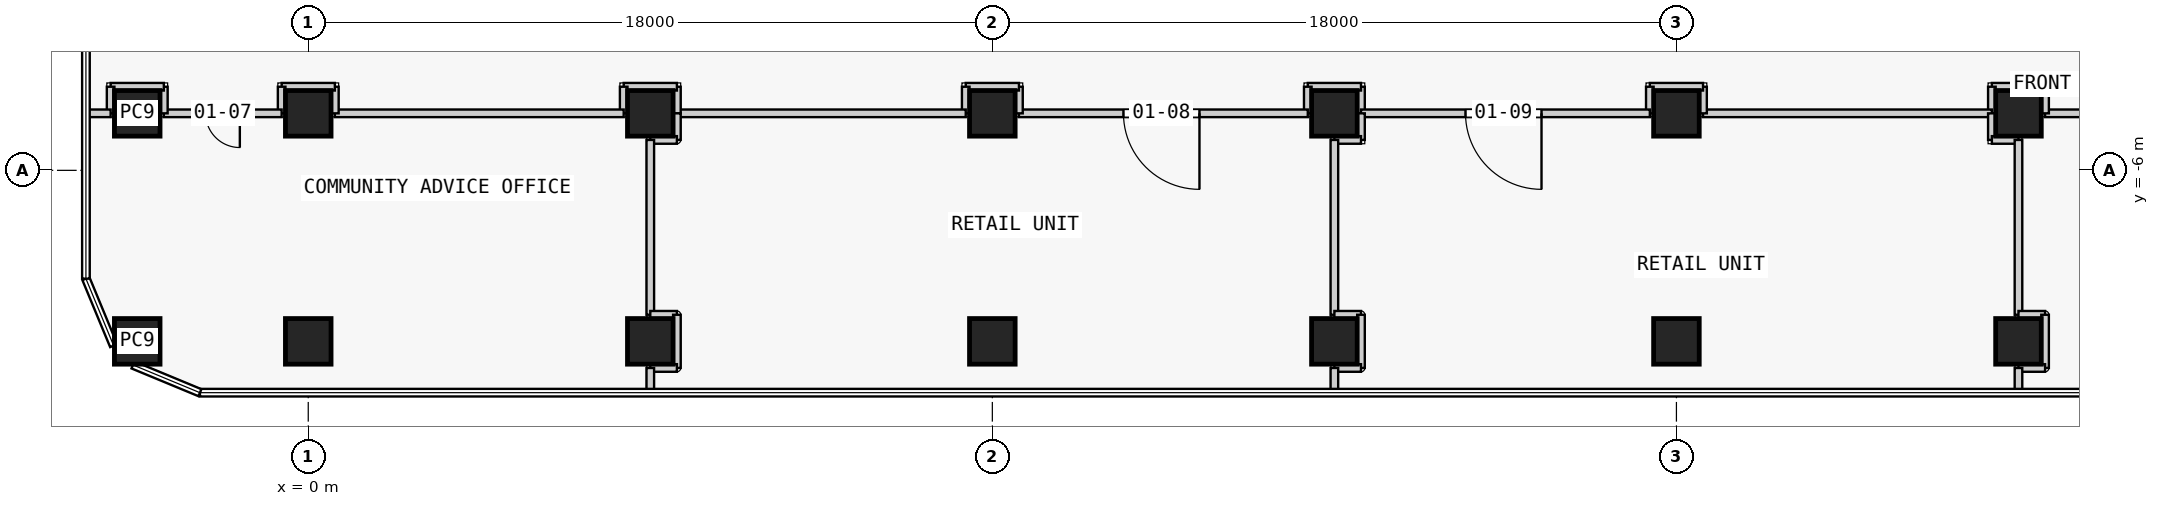
"""IFC4 building model, lengths in metres.
Left out: names, types, materials, properties, quantities, classifications, styles, units other than length and angle.
Written with IfcOpenShell. Run it as: python <this file> out.ifc"""

import sys

from ifc_helpers import new_model, si_unit, direction, frame, frame_2d, origin, origin_2d, place, context, subcontext, project, spatial, rectangle, extrude, element, fill, save


model = new_model("IFC4")
c1 = context("Model", 3, precision=1e-05, world=origin(), true_north=direction((0.0, 1.0)))
c2 = subcontext(c1, "Body", "Model", "MODEL_VIEW")
j1 = project(units=[si_unit("LENGTHUNIT", "METRE"), si_unit("PLANEANGLEUNIT", "RADIAN")], contexts=[c1])
p1 = place(None, origin())
s1 = spatial("IfcSite", under=j1, at=p1, CompositionType="ELEMENT")
p2 = place(p1, origin())
s2 = spatial("IfcBuilding", under=s1, at=p2, CompositionType="ELEMENT")
p3 = place(p2, frame((0.0, 0.0, 8.0)))
s3 = spatial("IfcBuildingStorey", under=s2, at=p3, CompositionType="ELEMENT", Elevation=8.0)
for number, where, z_axis, x_axis in (
    (1, (-4.5, -10.5, 0.0), (0.0, 0.0, 1.0), (1.0, 0.0, 0.0)),
    (2, (-4.5, -4.5, 0.0), (0.0, 0.0, 1.0), (1.0, 0.0, 0.0)),
    (3, (0.0, -10.5, 0.0), (0.0, 0.0, 1.0), (1.0, 0.0, 0.0)),
    (4, (0.0, -4.5, 0.0), (0.0, 0.0, 1.0), (1.0, 0.0, 0.0)),
    (5, (9.0, -10.5, 0.0), (0.0, 0.0, 1.0), (1.0, 0.0, 0.0)),
    (6, (9.0, -4.5, 0.0), (0.0, 0.0, 1.0), (1.0, 0.0, 0.0)),
    (7, (18.0, -10.5, 0.0), (0.0, 0.0, 1.0), (1.0, 0.0, 0.0)),
    (8, (18.0, -4.5, 0.0), (0.0, 0.0, 1.0), (1.0, 0.0, 0.0)),
    (9, (27.0, -10.5, 0.0), (0.0, 0.0, 1.0), (1.0, 0.0, 0.0)),
    (10, (27.0, -4.5, 0.0), (0.0, 0.0, 1.0), (1.0, 0.0, 0.0)),
    (11, (36.0, -10.5, 0.0), (0.0, 0.0, 1.0), (1.0, 0.0, 0.0)),
    (12, (36.0, -4.5, 0.0), (0.0, 0.0, 1.0), (1.0, 0.0, 0.0)),
    (13, (45.0, -10.5, 0.0), (0.0, 0.0, 1.0), (1.0, 0.0, 0.0)),
    (14, (45.0, -4.5, 0.0), (0.0, 0.0, 1.0), (1.0, 0.0, 0.0)),
):
    element("IfcColumn", number, at=place(p3, frame(where, z_axis=z_axis, x_axis=x_axis)), inside=s3, PredefinedType="COLUMN", context=c2, shape_type="SweptSolid", body=[
        extrude(rectangle(XDim=1.2, YDim=1.2, at=origin_2d()), origin(), (0.0, 0.0, 1.0), 4.8),
    ])
p4 = place(p3, frame((53.3, -4.5, 0.0), z_axis=(0.0, 0.0, 1.0), x_axis=(-1.0, 0.0, 0.0)))
e15 = element("IfcWall", 15, at=p4, inside=s3, PredefinedType="PARTITIONING", context=c2, shape_type="SweptSolid", body=[
    extrude(rectangle(XDim=7.6, YDim=0.2, at=frame_2d((3.8, 0.0))), origin(), (0.0, 0.0, 1.0), 3.75),
])
p5 = place(p3, frame((45.7, -4.5, 0.0), z_axis=(0.0, 0.0, 1.0), x_axis=(0.0, 1.0, 0.0)))
e16 = element("IfcWall", 16, at=p5, inside=s3, PredefinedType="PARTITIONING", context=c2, shape_type="SweptSolid", body=[
    extrude(rectangle(XDim=0.7, YDim=0.2, at=frame_2d((0.35, 0.0))), origin(), (0.0, 0.0, 1.0), 3.75),
])
p6 = place(p3, frame((45.7, -3.8, 0.0), z_axis=(0.0, 0.0, 1.0), x_axis=(-1.0, 0.0, 0.0)))
e17 = element("IfcWall", 17, at=p6, inside=s3, PredefinedType="PARTITIONING", context=c2, shape_type="SweptSolid", body=[
    extrude(rectangle(XDim=1.4, YDim=0.2, at=frame_2d((0.7, 0.0))), origin(), (0.0, 0.0, 1.0), 3.75),
])
for number, where, z_axis, x_axis in (
    (18, (44.3, -3.8, 0.0), (0.0, 0.0, 1.0), (0.0, -1.0, 0.0)),
    (19, (27.7, -4.5, 0.0), (0.0, 0.0, 1.0), (0.0, 1.0, 0.0)),
):
    element("IfcWall", number, at=place(p3, frame(where, z_axis=z_axis, x_axis=x_axis)), inside=s3, PredefinedType="PARTITIONING", context=c2, shape_type="SweptSolid", body=[
        extrude(rectangle(XDim=0.7, YDim=0.2, at=frame_2d((0.35, 0.0))), origin(), (0.0, 0.0, 1.0), 3.75),
    ])
p7 = place(p3, frame((27.7, -3.8, 0.0), z_axis=(0.0, 0.0, 1.0), x_axis=(-1.0, 0.0, 0.0)))
e20 = element("IfcWall", 20, at=p7, inside=s3, PredefinedType="PARTITIONING", context=c2, shape_type="SweptSolid", body=[
    extrude(rectangle(XDim=1.4, YDim=0.2, at=frame_2d((0.7, 0.0))), origin(), (0.0, 0.0, 1.0), 3.75),
])
p8 = place(p3, frame((26.3, -3.8, 0.0), z_axis=(0.0, 0.0, 1.0), x_axis=(0.0, -1.0, 0.0)))
e21 = element("IfcWall", 21, at=p8, inside=s3, PredefinedType="PARTITIONING", context=c2, shape_type="SweptSolid", body=[
    extrude(rectangle(XDim=0.7, YDim=0.2, at=frame_2d((0.35, 0.0))), origin(), (0.0, 0.0, 1.0), 3.75),
])
p9 = place(p3, frame((26.3, -4.5, 0.0), z_axis=(0.0, 0.0, 1.0), x_axis=(-1.0, 0.0, 0.0)))
e22 = element("IfcWall", 22, at=p9, inside=s3, PredefinedType="PARTITIONING", context=c2, shape_type="SweptSolid", body=[
    extrude(rectangle(XDim=7.6, YDim=0.2, at=frame_2d((3.8, 0.0))), origin(), (0.0, 0.0, 1.0), 3.75),
])
p10 = place(p9, frame((2.85, 0.0, 0.0)))
e23 = element("IfcOpeningElement", 23, at=p10, cuts=e22, PredefinedType="OPENING", context=c2, shape_type="SweptSolid", body=[
    extrude(rectangle(XDim=2.0, YDim=2.4, at=frame_2d((1.0, 1.2))), frame((0.0, 0.11, 0.0), z_axis=(0.0, -1.0, 0.0), x_axis=(1.0, 0.0, 0.0)), (0.0, 0.0, 1.0), 0.22),
])
p11 = place(p3, frame((18.7, -4.5, 0.0), z_axis=(0.0, 0.0, 1.0), x_axis=(0.0, 1.0, 0.0)))
e24 = element("IfcWall", 24, at=p11, inside=s3, PredefinedType="PARTITIONING", context=c2, shape_type="SweptSolid", body=[
    extrude(rectangle(XDim=0.7, YDim=0.2, at=frame_2d((0.35, 0.0))), origin(), (0.0, 0.0, 1.0), 3.75),
])
p12 = place(p3, frame((18.7, -3.8, 0.0), z_axis=(0.0, 0.0, 1.0), x_axis=(-1.0, 0.0, 0.0)))
e25 = element("IfcWall", 25, at=p12, inside=s3, PredefinedType="PARTITIONING", context=c2, shape_type="SweptSolid", body=[
    extrude(rectangle(XDim=1.4, YDim=0.2, at=frame_2d((0.7, 0.0))), origin(), (0.0, 0.0, 1.0), 4.45),
])
p13 = place(p3, frame((17.3, -3.8, 0.0), z_axis=(0.0, 0.0, 1.0), x_axis=(0.0, -1.0, 0.0)))
e26 = element("IfcWall", 26, at=p13, inside=s3, PredefinedType="PARTITIONING", context=c2, shape_type="SweptSolid", body=[
    extrude(rectangle(XDim=0.7, YDim=0.2, at=frame_2d((0.35, 0.0))), origin(), (0.0, 0.0, 1.0), 3.75),
])
for number, where, z_axis, x_axis in (
    (27, (17.3, -4.5, 0.0), (0.0, 0.0, 1.0), (-1.0, 0.0, 0.0)),
    (28, (44.3, -4.5, 0.0), (0.0, 0.0, 1.0), (-1.0, 0.0, 0.0)),
):
    element("IfcWall", number, at=place(p3, frame(where, z_axis=z_axis, x_axis=x_axis)), inside=s3, PredefinedType="PARTITIONING", context=c2, shape_type="SweptSolid", body=[
        extrude(rectangle(XDim=7.6, YDim=0.2, at=frame_2d((3.8, 0.0))), origin(), (0.0, 0.0, 1.0), 3.75),
    ])
p14 = place(p3, frame((36.7, -4.5, 0.0), z_axis=(0.0, 0.0, 1.0), x_axis=(0.0, 1.0, 0.0)))
e29 = element("IfcWall", 29, at=p14, inside=s3, PredefinedType="PARTITIONING", context=c2, shape_type="SweptSolid", body=[
    extrude(rectangle(XDim=0.7, YDim=0.2, at=frame_2d((0.35, 0.0))), origin(), (0.0, 0.0, 1.0), 3.75),
])
p15 = place(p3, frame((36.7, -3.8, 0.0), z_axis=(0.0, 0.0, 1.0), x_axis=(-1.0, 0.0, 0.0)))
e30 = element("IfcWall", 30, at=p15, inside=s3, PredefinedType="PARTITIONING", context=c2, shape_type="SweptSolid", body=[
    extrude(rectangle(XDim=1.4, YDim=0.2, at=frame_2d((0.7, 0.0))), origin(), (0.0, 0.0, 1.0), 3.75),
])
p16 = place(p3, frame((35.3, -3.8, 0.0), z_axis=(0.0, 0.0, 1.0), x_axis=(0.0, -1.0, 0.0)))
e31 = element("IfcWall", 31, at=p16, inside=s3, PredefinedType="PARTITIONING", context=c2, shape_type="SweptSolid", body=[
    extrude(rectangle(XDim=0.7, YDim=0.2, at=frame_2d((0.35, 0.0))), origin(), (0.0, 0.0, 1.0), 3.75),
])
p17 = place(p3, frame((35.3, -4.5, 0.0), z_axis=(0.0, 0.0, 1.0), x_axis=(-1.0, 0.0, 0.0)))
e32 = element("IfcWall", 32, at=p17, inside=s3, PredefinedType="PARTITIONING", context=c2, shape_type="SweptSolid", body=[
    extrude(rectangle(XDim=7.6, YDim=0.2, at=frame_2d((3.8, 0.0))), origin(), (0.0, 0.0, 1.0), 3.75),
])
p18 = place(p17, frame((2.85, 0.0, 0.0)))
e33 = element("IfcOpeningElement", 33, at=p18, cuts=e32, PredefinedType="OPENING", context=c2, shape_type="SweptSolid", body=[
    extrude(rectangle(XDim=2.0, YDim=2.4, at=frame_2d((1.0, 1.2))), frame((0.0, 0.11, 0.0), z_axis=(0.0, -1.0, 0.0), x_axis=(1.0, 0.0, 0.0)), (0.0, 0.0, 1.0), 0.22),
])
p19 = place(p3, frame((9.7, -4.5, 0.0), z_axis=(0.0, 0.0, 1.0), x_axis=(0.0, 1.0, 0.0)))
e34 = element("IfcWall", 34, at=p19, inside=s3, PredefinedType="PARTITIONING", context=c2, shape_type="SweptSolid", body=[
    extrude(rectangle(XDim=0.7, YDim=0.2, at=frame_2d((0.35, 0.0))), origin(), (0.0, 0.0, 1.0), 3.75),
])
p20 = place(p3, frame((9.7, -3.8, 0.0), z_axis=(0.0, 0.0, 1.0), x_axis=(-1.0, 0.0, 0.0)))
e35 = element("IfcWall", 35, at=p20, inside=s3, PredefinedType="PARTITIONING", context=c2, shape_type="SweptSolid", body=[
    extrude(rectangle(XDim=1.4, YDim=0.2, at=frame_2d((0.7, 0.0))), origin(), (0.0, 0.0, 1.0), 4.45),
])
p21 = place(p3, frame((8.3, -3.8, 0.0), z_axis=(0.0, 0.0, 1.0), x_axis=(0.0, -1.0, 0.0)))
e36 = element("IfcWall", 36, at=p21, inside=s3, PredefinedType="PARTITIONING", context=c2, shape_type="SweptSolid", body=[
    extrude(rectangle(XDim=0.7, YDim=0.2, at=frame_2d((0.35, 0.0))), origin(), (0.0, 0.0, 1.0), 3.75),
])
p22 = place(p3, frame((8.3, -4.5, 0.0), z_axis=(0.0, 0.0, 1.0), x_axis=(-1.0, 0.0, 0.0)))
e37 = element("IfcWall", 37, at=p22, inside=s3, PredefinedType="PARTITIONING", context=c2, shape_type="SweptSolid", body=[
    extrude(rectangle(XDim=7.6, YDim=0.2, at=frame_2d((3.8, 0.0))), origin(), (0.0, 0.0, 1.0), 3.75),
])
p23 = place(p3, frame((0.7, -4.5, 0.0), z_axis=(0.0, 0.0, 1.0), x_axis=(0.0, 1.0, 0.0)))
e38 = element("IfcWall", 38, at=p23, inside=s3, PredefinedType="PARTITIONING", context=c2, shape_type="SweptSolid", body=[
    extrude(rectangle(XDim=0.7, YDim=0.2, at=frame_2d((0.35, 0.0))), origin(), (0.0, 0.0, 1.0), 3.75),
])
p24 = place(p3, frame((0.7, -3.8, 0.0), z_axis=(0.0, 0.0, 1.0), x_axis=(-1.0, 0.0, 0.0)))
e39 = element("IfcWall", 39, at=p24, inside=s3, PredefinedType="PARTITIONING", context=c2, shape_type="SweptSolid", body=[
    extrude(rectangle(XDim=1.4, YDim=0.2, at=frame_2d((0.7, 0.0))), origin(), (0.0, 0.0, 1.0), 4.45),
])
p25 = place(p3, frame((-0.7, -3.8, 0.0), z_axis=(0.0, 0.0, 1.0), x_axis=(0.0, -1.0, 0.0)))
e40 = element("IfcWall", 40, at=p25, inside=s3, PredefinedType="PARTITIONING", context=c2, shape_type="SweptSolid", body=[
    extrude(rectangle(XDim=0.7, YDim=0.2, at=frame_2d((0.35, 0.0))), origin(), (0.0, 0.0, 1.0), 3.75),
])
p26 = place(p3, frame((-0.7, -4.5, 0.0), z_axis=(0.0, 0.0, 1.0), x_axis=(-1.0, 0.0, 0.0)))
e41 = element("IfcWall", 41, at=p26, inside=s3, PredefinedType="PARTITIONING", context=c2, shape_type="SweptSolid", body=[
    extrude(rectangle(XDim=3.1, YDim=0.2, at=frame_2d((1.55, 0.0))), origin(), (0.0, 0.0, 1.0), 3.75),
])
p27 = place(p26, frame((1.1, 0.0, 0.0)))
e42 = element("IfcOpeningElement", 42, at=p27, cuts=e41, PredefinedType="OPENING", context=c2, shape_type="SweptSolid", body=[
    extrude(rectangle(XDim=0.9, YDim=2.1, at=frame_2d((0.45, 1.05))), frame((0.0, 0.11, 0.0), z_axis=(0.0, -1.0, 0.0), x_axis=(1.0, 0.0, 0.0)), (0.0, 0.0, 1.0), 0.22),
])
for number, where, z_axis, x_axis in (
    (43, (-3.8, -4.5, 0.0), (0.0, 0.0, 1.0), (0.0, 1.0, 0.0)),
    (44, (44.3, -4.5, 0.0), (0.0, 0.0, 1.0), (0.0, -1.0, 0.0)),
    (45, (44.3, -5.2, 0.0), (0.0, 0.0, 1.0), (1.0, 0.0, 0.0)),
):
    element("IfcWall", number, at=place(p3, frame(where, z_axis=z_axis, x_axis=x_axis)), inside=s3, PredefinedType="PARTITIONING", context=c2, shape_type="SweptSolid", body=[
        extrude(rectangle(XDim=0.7, YDim=0.2, at=frame_2d((0.35, 0.0))), origin(), (0.0, 0.0, 1.0), 3.75),
    ])
p28 = place(p3, frame((45.0, -5.2, 0.0), z_axis=(0.0, 0.0, 1.0), x_axis=(0.0, -1.0, 0.0)))
e46 = element("IfcWall", 46, at=p28, inside=s3, PredefinedType="PARTITIONING", context=c2, shape_type="SweptSolid", body=[
    extrude(rectangle(XDim=4.6, YDim=0.2, at=frame_2d((2.3, 0.0))), origin(), (0.0, 0.0, 1.0), 3.75),
])
p29 = place(p3, frame((45.0, -9.8, 0.0), z_axis=(0.0, 0.0, 1.0), x_axis=(1.0, 0.0, 0.0)))
e47 = element("IfcWall", 47, at=p29, inside=s3, PredefinedType="PARTITIONING", context=c2, shape_type="SweptSolid", body=[
    extrude(rectangle(XDim=0.7, YDim=0.2, at=frame_2d((0.35, 0.0))), origin(), (0.0, 0.0, 1.0), 3.75),
])
p30 = place(p3, frame((45.7, -9.8, 0.0), z_axis=(0.0, 0.0, 1.0), x_axis=(0.0, -1.0, 0.0)))
e48 = element("IfcWall", 48, at=p30, inside=s3, PredefinedType="PARTITIONING", context=c2, shape_type="SweptSolid", body=[
    extrude(rectangle(XDim=1.4, YDim=0.2, at=frame_2d((0.7, 0.0))), origin(), (0.0, 0.0, 1.0), 3.75),
])
p31 = place(p3, frame((45.7, -11.2, 0.0), z_axis=(0.0, 0.0, 1.0), x_axis=(-1.0, 0.0, 0.0)))
e49 = element("IfcWall", 49, at=p31, inside=s3, PredefinedType="PARTITIONING", context=c2, shape_type="SweptSolid", body=[
    extrude(rectangle(XDim=0.7, YDim=0.2, at=frame_2d((0.35, 0.0))), origin(), (0.0, 0.0, 1.0), 4.45),
])
p32 = place(p3, frame((45.0, -11.2, 0.0), z_axis=(0.0, 0.0, 1.0), x_axis=(0.0, -1.0, 0.0)))
e50 = element("IfcWall", 50, at=p32, inside=s3, PredefinedType="PARTITIONING", context=c2, shape_type="SweptSolid", body=[
    extrude(rectangle(XDim=0.65, YDim=0.2, at=frame_2d((0.325, 0.0))), origin(), (0.0, 0.0, 1.0), 4.45),
])
for number, where, z_axis, x_axis in (
    (51, (27.7, -4.5, 0.0), (0.0, 0.0, 1.0), (0.0, -1.0, 0.0)),
    (52, (27.7, -5.2, 0.0), (0.0, 0.0, 1.0), (-1.0, 0.0, 0.0)),
):
    element("IfcWall", number, at=place(p3, frame(where, z_axis=z_axis, x_axis=x_axis)), inside=s3, PredefinedType="PARTITIONING", context=c2, shape_type="SweptSolid", body=[
        extrude(rectangle(XDim=0.7, YDim=0.2, at=frame_2d((0.35, 0.0))), origin(), (0.0, 0.0, 1.0), 3.75),
    ])
p33 = place(p3, frame((27.0, -5.2, 0.0), z_axis=(0.0, 0.0, 1.0), x_axis=(0.0, -1.0, 0.0)))
e53 = element("IfcWall", 53, at=p33, inside=s3, PredefinedType="PARTITIONING", context=c2, shape_type="SweptSolid", body=[
    extrude(rectangle(XDim=4.6, YDim=0.2, at=frame_2d((2.3, 0.0))), origin(), (0.0, 0.0, 1.0), 3.75),
])
p34 = place(p3, frame((27.0, -9.8, 0.0), z_axis=(0.0, 0.0, 1.0), x_axis=(1.0, 0.0, 0.0)))
e54 = element("IfcWall", 54, at=p34, inside=s3, PredefinedType="PARTITIONING", context=c2, shape_type="SweptSolid", body=[
    extrude(rectangle(XDim=0.7, YDim=0.2, at=frame_2d((0.35, 0.0))), origin(), (0.0, 0.0, 1.0), 3.75),
])
p35 = place(p3, frame((27.7, -9.8, 0.0), z_axis=(0.0, 0.0, 1.0), x_axis=(0.0, -1.0, 0.0)))
e55 = element("IfcWall", 55, at=p35, inside=s3, PredefinedType="PARTITIONING", context=c2, shape_type="SweptSolid", body=[
    extrude(rectangle(XDim=1.4, YDim=0.2, at=frame_2d((0.7, 0.0))), origin(), (0.0, 0.0, 1.0), 3.75),
])
p36 = place(p3, frame((27.7, -11.2, 0.0), z_axis=(0.0, 0.0, 1.0), x_axis=(-1.0, 0.0, 0.0)))
e56 = element("IfcWall", 56, at=p36, inside=s3, PredefinedType="PARTITIONING", context=c2, shape_type="SweptSolid", body=[
    extrude(rectangle(XDim=0.7, YDim=0.2, at=frame_2d((0.35, 0.0))), origin(), (0.0, 0.0, 1.0), 4.45),
])
p37 = place(p3, frame((27.0, -11.2, 0.0), z_axis=(0.0, 0.0, 1.0), x_axis=(0.0, -1.0, 0.0)))
e57 = element("IfcWall", 57, at=p37, inside=s3, PredefinedType="PARTITIONING", context=c2, shape_type="SweptSolid", body=[
    extrude(rectangle(XDim=0.65, YDim=0.2, at=frame_2d((0.325, 0.0))), origin(), (0.0, 0.0, 1.0), 4.45),
])
for number, where, z_axis, x_axis in (
    (58, (9.7, -4.5, 0.0), (0.0, 0.0, 1.0), (0.0, -1.0, 0.0)),
    (59, (9.7, -5.2, 0.0), (0.0, 0.0, 1.0), (-1.0, 0.0, 0.0)),
):
    element("IfcWall", number, at=place(p3, frame(where, z_axis=z_axis, x_axis=x_axis)), inside=s3, PredefinedType="PARTITIONING", context=c2, shape_type="SweptSolid", body=[
        extrude(rectangle(XDim=0.7, YDim=0.2, at=frame_2d((0.35, 0.0))), origin(), (0.0, 0.0, 1.0), 3.75),
    ])
p38 = place(p3, frame((9.0, -5.2, 0.0), z_axis=(0.0, 0.0, 1.0), x_axis=(0.0, -1.0, 0.0)))
e60 = element("IfcWall", 60, at=p38, inside=s3, PredefinedType="PARTITIONING", context=c2, shape_type="SweptSolid", body=[
    extrude(rectangle(XDim=4.6, YDim=0.2, at=frame_2d((2.3, 0.0))), origin(), (0.0, 0.0, 1.0), 3.75),
])
p39 = place(p3, frame((9.0, -9.8, 0.0), z_axis=(0.0, 0.0, 1.0), x_axis=(1.0, 0.0, 0.0)))
e61 = element("IfcWall", 61, at=p39, inside=s3, PredefinedType="PARTITIONING", context=c2, shape_type="SweptSolid", body=[
    extrude(rectangle(XDim=0.7, YDim=0.2, at=frame_2d((0.35, 0.0))), origin(), (0.0, 0.0, 1.0), 3.75),
])
p40 = place(p3, frame((9.7, -9.8, 0.0), z_axis=(0.0, 0.0, 1.0), x_axis=(0.0, -1.0, 0.0)))
e62 = element("IfcWall", 62, at=p40, inside=s3, PredefinedType="PARTITIONING", context=c2, shape_type="SweptSolid", body=[
    extrude(rectangle(XDim=1.4, YDim=0.2, at=frame_2d((0.7, 0.0))), origin(), (0.0, 0.0, 1.0), 3.75),
])
p41 = place(p3, frame((9.7, -11.2, 0.0), z_axis=(0.0, 0.0, 1.0), x_axis=(-1.0, 0.0, 0.0)))
e63 = element("IfcWall", 63, at=p41, inside=s3, PredefinedType="PARTITIONING", context=c2, shape_type="SweptSolid", body=[
    extrude(rectangle(XDim=0.7, YDim=0.2, at=frame_2d((0.35, 0.0))), origin(), (0.0, 0.0, 1.0), 4.45),
])
p42 = place(p3, frame((9.0, -11.2, 0.0), z_axis=(0.0, 0.0, 1.0), x_axis=(0.0, -1.0, 0.0)))
e64 = element("IfcWall", 64, at=p42, inside=s3, PredefinedType="PARTITIONING", context=c2, shape_type="SweptSolid", body=[
    extrude(rectangle(XDim=0.65, YDim=0.2, at=frame_2d((0.325, 0.0))), origin(), (0.0, 0.0, 1.0), 4.45),
])
p43 = place(p3, frame((-3.8, -3.8, 0.0), z_axis=(0.0, 0.0, 1.0), x_axis=(-1.0, 0.0, 0.0)))
e65 = element("IfcWall", 65, at=p43, inside=s3, PredefinedType="PARTITIONING", context=c2, shape_type="SweptSolid", body=[
    extrude(rectangle(XDim=1.4, YDim=0.2, at=frame_2d((0.7, 0.0))), origin(), (0.0, 0.0, 1.0), 3.75),
])
p44 = place(p3, frame((-5.2, -3.8, 0.0), z_axis=(0.0, 0.0, 1.0), x_axis=(0.0, -1.0, 0.0)))
e66 = element("IfcWall", 66, at=p44, inside=s3, PredefinedType="PARTITIONING", context=c2, shape_type="SweptSolid", body=[
    extrude(rectangle(XDim=0.7, YDim=0.2, at=frame_2d((0.35, 0.0))), origin(), (0.0, 0.0, 1.0), 4.45),
])
p45 = place(p3, frame((-5.2, -4.5, 0.0), z_axis=(0.0, 0.0, 1.0), x_axis=(-1.0, 0.0, 0.0)))
e67 = element("IfcWall", 67, at=p45, inside=s3, PredefinedType="PARTITIONING", context=c2, shape_type="SweptSolid", body=[
    extrude(rectangle(XDim=0.65, YDim=0.2, at=frame_2d((0.325, 0.0))), origin(), (0.0, 0.0, 1.0), 4.45),
])
p46 = place(p27, origin())
e68 = element("IfcDoor", 68, at=p46, inside=s3, OperationType="SINGLE_SWING_LEFT", PredefinedType="DOOR", context=c2, shape_type="SweptSolid", body=[
    extrude(rectangle(XDim=0.9, YDim=2.1, at=frame_2d((0.45, 1.05))), frame((0.0, 0.025, 0.0), z_axis=(0.0, -1.0, 0.0), x_axis=(1.0, 0.0, 0.0)), (0.0, 0.0, 1.0), 0.05),
])
fill(e42, e68)
p47 = place(p10, origin())
e69 = element("IfcDoor", 69, at=p47, inside=s3, OperationType="SINGLE_SWING_LEFT", PredefinedType="DOOR", context=c2, shape_type="SweptSolid", body=[
    extrude(rectangle(XDim=2.0, YDim=2.4, at=frame_2d((1.0, 1.2))), frame((0.0, 0.025, 0.0), z_axis=(0.0, -1.0, 0.0), x_axis=(1.0, 0.0, 0.0)), (0.0, 0.0, 1.0), 0.05),
])
fill(e23, e69)
p48 = place(p18, origin())
e70 = element("IfcDoor", 70, at=p48, inside=s3, OperationType="SINGLE_SWING_LEFT", PredefinedType="DOOR", context=c2, shape_type="SweptSolid", body=[
    extrude(rectangle(XDim=2.0, YDim=2.4, at=frame_2d((1.0, 1.2))), frame((0.0, 0.025, 0.0), z_axis=(0.0, -1.0, 0.0), x_axis=(1.0, 0.0, 0.0)), (0.0, 0.0, 1.0), 0.05),
])
fill(e33, e70)
save(model, sys.argv[1])
